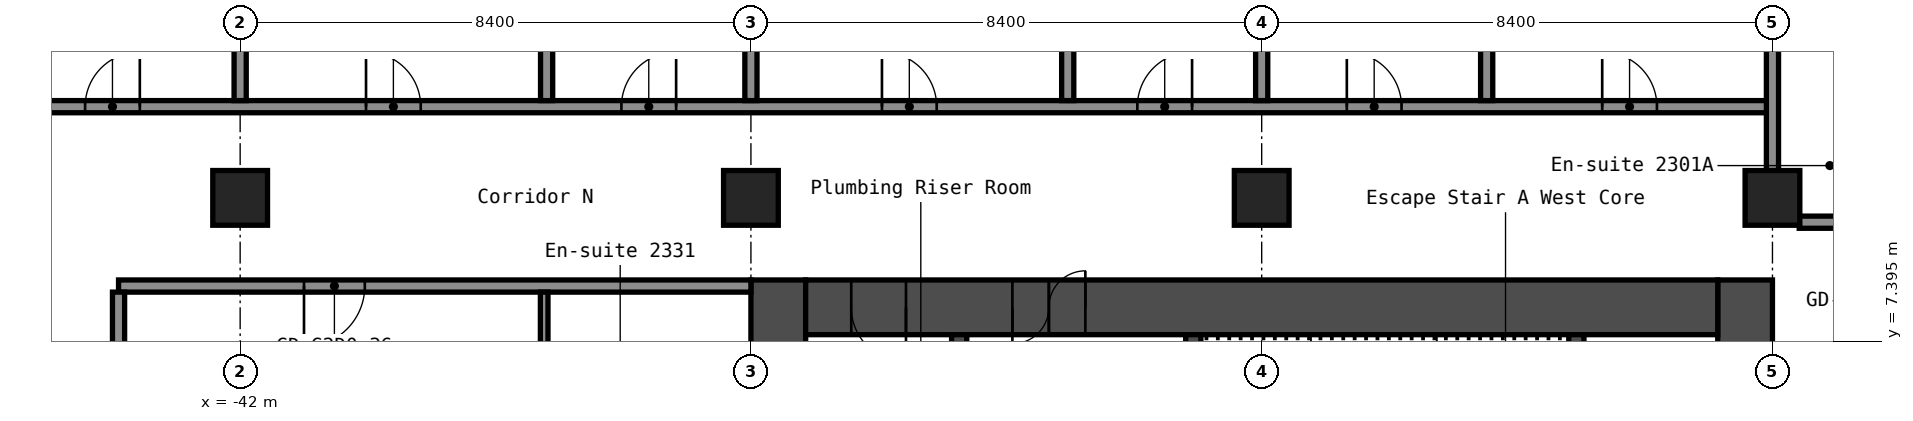
"""IFC4 building model, lengths in metres.
Left out: names, types, materials, properties, quantities, classifications, styles, units other than length and angle.
Written with IfcOpenShell. Run it as: python <this file> out.ifc"""

import sys

from ifc_helpers import new_model, si_unit, direction, frame, frame_2d, origin, origin_2d, place, context, subcontext, project, spatial, rectangle, hollow_rectangle, extrude, element, fill, save


model = new_model("IFC4")
c1 = context("Model", 3, precision=1e-05, world=origin(), true_north=direction((0.0, 1.0)))
c2 = subcontext(c1, "Body", "Model", "MODEL_VIEW")
j1 = project(units=[si_unit("LENGTHUNIT", "METRE"), si_unit("PLANEANGLEUNIT", "RADIAN")], contexts=[c1])
p1 = place(None, origin())
s1 = spatial("IfcSite", under=j1, at=p1, CompositionType="ELEMENT")
p2 = place(p1, origin())
s2 = spatial("IfcBuilding", under=s1, at=p2, CompositionType="ELEMENT")
p3 = place(p2, frame((0.0, 0.0, 85.0)))
s3 = spatial("IfcBuildingStorey", under=s2, at=p3, CompositionType="ELEMENT", Elevation=85.0)
for number, where, z_axis, x_axis in (
    (1, (-42.0, 9.75, 0.0), (0.0, 0.0, 1.0), (1.0, 0.0, 0.0)),
    (2, (-33.6, 9.75, 0.0), (0.0, 0.0, 1.0), (1.0, 0.0, 0.0)),
    (3, (-25.2, 9.75, 0.0), (0.0, 0.0, 1.0), (1.0, 0.0, 0.0)),
    (4, (-16.8, 9.75, 0.0), (0.0, 0.0, 1.0), (1.0, 0.0, 0.0)),
):
    element("IfcColumn", number, at=place(p3, frame(where, z_axis=z_axis, x_axis=x_axis)), inside=s3, PredefinedType="COLUMN", context=c2, shape_type="SweptSolid", body=[
        extrude(hollow_rectangle(XDim=0.9, YDim=0.9, WallThickness=0.036, at=origin_2d()), origin(), (0.0, 0.0, 1.0), 2.8),
    ])
p4 = place(p3, frame((-17.25, -8.4, 0.0), z_axis=(0.0, 0.0, 1.0), x_axis=(0.0, 1.0, 0.0)))
e5 = element("IfcWall", 5, at=p4, inside=s3, PredefinedType="SHEAR", context=c2, shape_type="SweptSolid", body=[
    extrude(rectangle(XDim=16.8, YDim=0.9, at=frame_2d((8.4, 0.0))), origin(), (0.0, 0.0, 1.0), 2.8),
])
p5 = place(p4, frame((7.6, 0.0, 0.0)))
e6 = element("IfcOpeningElement", 6, at=p5, cuts=e5, PredefinedType="OPENING", context=c2, shape_type="SweptSolid", body=[
    extrude(rectangle(XDim=1.2, YDim=2.1, at=frame_2d((0.6, 1.05))), frame((0.0, 0.46, 0.0), z_axis=(0.0, -1.0, 0.0), x_axis=(1.0, 0.0, 0.0)), (0.0, 0.0, 1.0), 0.92),
])
p6 = place(p3, frame((-33.15, -8.4, 0.0), z_axis=(0.0, 0.0, 1.0), x_axis=(0.0, 1.0, 0.0)))
e7 = element("IfcWall", 7, at=p6, inside=s3, PredefinedType="SHEAR", context=c2, shape_type="SweptSolid", body=[
    extrude(rectangle(XDim=16.8, YDim=0.9, at=frame_2d((8.4, 0.0))), origin(), (0.0, 0.0, 1.0), 2.8),
])
p7 = place(p3, frame((-32.7, 7.95, 0.0), z_axis=(0.0, 0.0, 1.0), x_axis=(1.0, 0.0, 0.0)))
e8 = element("IfcWall", 8, at=p7, inside=s3, PredefinedType="SHEAR", context=c2, shape_type="SweptSolid", body=[
    extrude(rectangle(XDim=15.0, YDim=0.9, at=frame_2d((7.5, 0.0))), origin(), (0.0, 0.0, 1.0), 2.8),
])
p8 = place(p7, frame((3.4, 0.0, 0.0)))
e9 = element("IfcOpeningElement", 9, at=p8, cuts=e8, PredefinedType="OPENING", context=c2, shape_type="SweptSolid", body=[
    extrude(rectangle(XDim=1.2, YDim=2.1, at=frame_2d((0.6, 1.05))), frame((0.0, 0.46, 0.0), z_axis=(0.0, -1.0, 0.0), x_axis=(1.0, 0.0, 0.0)), (0.0, 0.0, 1.0), 0.92),
])
p9 = place(p7, frame((0.75, 0.0, 0.0)))
e10 = element("IfcOpeningElement", 10, at=p9, cuts=e8, PredefinedType="OPENING", context=c2, shape_type="SweptSolid", body=[
    extrude(rectangle(XDim=0.9, YDim=2.1, at=frame_2d((0.45, 1.05))), frame((0.0, 0.46, 0.0), z_axis=(0.0, -1.0, 0.0), x_axis=(1.0, 0.0, 0.0)), (0.0, 0.0, 1.0), 0.92),
])
p10 = place(p3, frame((-20.025, 1.2, 0.0), z_axis=(0.0, 0.0, 1.0), x_axis=(0.0, 1.0, 0.0)))
e11 = element("IfcWall", 11, at=p10, inside=s3, PredefinedType="SHEAR", context=c2, shape_type="SweptSolid", body=[
    extrude(rectangle(XDim=6.3, YDim=0.25, at=frame_2d((3.15, 0.0))), origin(), (0.0, 0.0, 1.0), 2.8),
])
p11 = place(p3, frame((-26.325, 3.75, 0.0), z_axis=(0.0, 0.0, 1.0), x_axis=(0.0, 1.0, 0.0)))
e12 = element("IfcWall", 12, at=p11, inside=s3, PredefinedType="SHEAR", context=c2, shape_type="SweptSolid", body=[
    extrude(rectangle(XDim=3.75, YDim=0.25, at=frame_2d((1.875, 0.0))), origin(), (0.0, 0.0, 1.0), 2.8),
])
p12 = place(p11, frame((1.25, 0.0, 0.0)))
e13 = element("IfcOpeningElement", 13, at=p12, cuts=e12, PredefinedType="OPENING", context=c2, shape_type="SweptSolid", body=[
    extrude(rectangle(XDim=1.2, YDim=2.1, at=frame_2d((0.6, 1.05))), frame((0.0, 0.135, 0.0), z_axis=(0.0, -1.0, 0.0), x_axis=(1.0, 0.0, 0.0)), (0.0, 0.0, 1.0), 0.27),
])
p13 = place(p3, frame((-30.175, 1.45, 0.0), z_axis=(0.0, 0.0, 1.0), x_axis=(0.0, 1.0, 0.0)))
e14 = element("IfcWall", 14, at=p13, inside=s3, PredefinedType="SHEAR", context=c2, shape_type="SweptSolid", body=[
    extrude(rectangle(XDim=6.05, YDim=0.25, at=frame_2d((3.025, 0.0))), origin(), (0.0, 0.0, 1.0), 2.8),
])
p14 = place(p13, frame((2.625, 0.0, 0.0)))
e15 = element("IfcOpeningElement", 15, at=p14, cuts=e14, PredefinedType="OPENING", context=c2, shape_type="SweptSolid", body=[
    extrude(rectangle(XDim=1.1, YDim=2.1, at=frame_2d((0.55, 1.05))), frame((0.0, 0.135, 0.0), z_axis=(0.0, -1.0, 0.0), x_axis=(1.0, 0.0, 0.0)), (0.0, 0.0, 1.0), 0.27),
])
p15 = place(p3, frame((-44.0, 8.3, 0.0), z_axis=(0.0, 0.0, 1.0), x_axis=(1.0, 0.0, 0.0)))
e16 = element("IfcWall", 16, at=p15, inside=s3, PredefinedType="PARTITIONING", context=c2, shape_type="SweptSolid", body=[
    extrude(rectangle(XDim=10.4, YDim=0.2, at=frame_2d((5.2, 0.0))), origin(), (0.0, 0.0, 1.0), 2.8),
])
p16 = place(p15, frame((3.05, 0.0, 0.0)))
e17 = element("IfcOpeningElement", 17, at=p16, cuts=e16, PredefinedType="OPENING", context=c2, shape_type="SweptSolid", body=[
    extrude(rectangle(XDim=1.0, YDim=2.1, at=frame_2d((0.5, 1.05))), frame((0.0, 0.11, 0.0), z_axis=(0.0, -1.0, 0.0), x_axis=(1.0, 0.0, 0.0)), (0.0, 0.0, 1.0), 0.22),
])
p17 = place(p3, frame((-16.36, 9.35, 0.0), z_axis=(0.0, 0.0, 1.0), x_axis=(1.0, 0.0, 0.0)))
e18 = element("IfcWall", 18, at=p17, inside=s3, PredefinedType="PARTITIONING", context=c2, shape_type="SweptSolid", body=[
    extrude(rectangle(XDim=32.72, YDim=0.2, at=frame_2d((16.36, 0.0))), origin(), (0.0, 0.0, 1.0), 2.8),
])
p18 = place(p17, frame((2.41, 0.0, 0.0)))
e19 = element("IfcOpeningElement", 19, at=p18, cuts=e18, PredefinedType="OPENING", context=c2, shape_type="SweptSolid", body=[
    extrude(rectangle(XDim=1.0, YDim=2.1, at=frame_2d((0.5, 1.05))), frame((0.0, 0.11, 0.0), z_axis=(0.0, -1.0, 0.0), x_axis=(1.0, 0.0, 0.0)), (0.0, 0.0, 1.0), 0.22),
])
p19 = place(p17, frame((4.11, 0.0, 0.0)))
e20 = element("IfcOpeningElement", 20, at=p19, cuts=e18, PredefinedType="OPENING", context=c2, shape_type="SweptSolid", body=[
    extrude(rectangle(XDim=1.0, YDim=2.1, at=frame_2d((0.5, 1.05))), frame((0.0, 0.11, 0.0), z_axis=(0.0, -1.0, 0.0), x_axis=(1.0, 0.0, 0.0)), (0.0, 0.0, 1.0), 0.22),
])
p20 = place(p17, frame((9.96, 0.0, 0.0)))
e21 = element("IfcOpeningElement", 21, at=p20, cuts=e18, PredefinedType="OPENING", context=c2, shape_type="SweptSolid", body=[
    extrude(rectangle(XDim=1.0, YDim=2.1, at=frame_2d((0.5, 1.05))), frame((0.0, 0.11, 0.0), z_axis=(0.0, -1.0, 0.0), x_axis=(1.0, 0.0, 0.0)), (0.0, 0.0, 1.0), 0.22),
])
p21 = place(p17, frame((19.21, 0.0, 0.0)))
e22 = element("IfcOpeningElement", 22, at=p21, cuts=e18, PredefinedType="OPENING", context=c2, shape_type="SweptSolid", body=[
    extrude(rectangle(XDim=1.0, YDim=2.1, at=frame_2d((0.5, 1.05))), frame((0.0, 0.11, 0.0), z_axis=(0.0, -1.0, 0.0), x_axis=(1.0, 0.0, 0.0)), (0.0, 0.0, 1.0), 0.22),
])
p22 = place(p17, frame((20.91, 0.0, 0.0)))
e23 = element("IfcOpeningElement", 23, at=p22, cuts=e18, PredefinedType="OPENING", context=c2, shape_type="SweptSolid", body=[
    extrude(rectangle(XDim=1.0, YDim=2.1, at=frame_2d((0.5, 1.05))), frame((0.0, 0.11, 0.0), z_axis=(0.0, -1.0, 0.0), x_axis=(1.0, 0.0, 0.0)), (0.0, 0.0, 1.0), 0.22),
])
p23 = place(p17, frame((30.16, 0.0, 0.0)))
e24 = element("IfcOpeningElement", 24, at=p23, cuts=e18, PredefinedType="OPENING", context=c2, shape_type="SweptSolid", body=[
    extrude(rectangle(XDim=1.0, YDim=2.1, at=frame_2d((0.5, 1.05))), frame((0.0, 0.11, 0.0), z_axis=(0.0, -1.0, 0.0), x_axis=(1.0, 0.0, 0.0)), (0.0, 0.0, 1.0), 0.22),
])
p24 = place(p3, frame((-46.5, 11.25, 0.0), z_axis=(0.0, 0.0, 1.0), x_axis=(1.0, 0.0, 0.0)))
e25 = element("IfcWall", 25, at=p24, inside=s3, PredefinedType="PARTITIONING", context=c2, shape_type="SweptSolid", body=[
    extrude(rectangle(XDim=29.7, YDim=0.2, at=frame_2d((14.85, 0.0))), origin(), (0.0, 0.0, 1.0), 2.8),
])
p25 = place(p24, frame((1.95, 0.0, 0.0)))
e26 = element("IfcOpeningElement", 26, at=p25, cuts=e25, PredefinedType="OPENING", context=c2, shape_type="SweptSolid", body=[
    extrude(rectangle(XDim=0.9, YDim=2.1, at=frame_2d((0.45, 1.05))), frame((0.0, 0.11, 0.0), z_axis=(0.0, -1.0, 0.0), x_axis=(1.0, 0.0, 0.0)), (0.0, 0.0, 1.0), 0.22),
])
p26 = place(p24, frame((6.57, 0.0, 0.0)))
e27 = element("IfcOpeningElement", 27, at=p26, cuts=e25, PredefinedType="OPENING", context=c2, shape_type="SweptSolid", body=[
    extrude(rectangle(XDim=0.9, YDim=2.1, at=frame_2d((0.45, 1.05))), frame((0.0, 0.11, 0.0), z_axis=(0.0, -1.0, 0.0), x_axis=(1.0, 0.0, 0.0)), (0.0, 0.0, 1.0), 0.22),
])
p27 = place(p24, frame((10.77, 0.0, 0.0)))
e28 = element("IfcOpeningElement", 28, at=p27, cuts=e25, PredefinedType="OPENING", context=c2, shape_type="SweptSolid", body=[
    extrude(rectangle(XDim=0.9, YDim=2.1, at=frame_2d((0.45, 1.05))), frame((0.0, 0.11, 0.0), z_axis=(0.0, -1.0, 0.0), x_axis=(1.0, 0.0, 0.0)), (0.0, 0.0, 1.0), 0.22),
])
p28 = place(p24, frame((15.055, 0.0, 0.0)))
e29 = element("IfcOpeningElement", 29, at=p28, cuts=e25, PredefinedType="OPENING", context=c2, shape_type="SweptSolid", body=[
    extrude(rectangle(XDim=0.9, YDim=2.1, at=frame_2d((0.45, 1.05))), frame((0.0, 0.11, 0.0), z_axis=(0.0, -1.0, 0.0), x_axis=(1.0, 0.0, 0.0)), (0.0, 0.0, 1.0), 0.22),
])
p29 = place(p24, frame((19.255, 0.0, 0.0)))
e30 = element("IfcOpeningElement", 30, at=p29, cuts=e25, PredefinedType="OPENING", context=c2, shape_type="SweptSolid", body=[
    extrude(rectangle(XDim=0.9, YDim=2.1, at=frame_2d((0.45, 1.05))), frame((0.0, 0.11, 0.0), z_axis=(0.0, -1.0, 0.0), x_axis=(1.0, 0.0, 0.0)), (0.0, 0.0, 1.0), 0.22),
])
p30 = place(p24, frame((22.7, 0.0, 0.0)))
e31 = element("IfcOpeningElement", 31, at=p30, cuts=e25, PredefinedType="OPENING", context=c2, shape_type="SweptSolid", body=[
    extrude(rectangle(XDim=0.9, YDim=2.1, at=frame_2d((0.45, 1.05))), frame((0.0, 0.11, 0.0), z_axis=(0.0, -1.0, 0.0), x_axis=(1.0, 0.0, 0.0)), (0.0, 0.0, 1.0), 0.22),
])
p31 = place(p24, frame((26.9, 0.0, 0.0)))
e32 = element("IfcOpeningElement", 32, at=p31, cuts=e25, PredefinedType="OPENING", context=c2, shape_type="SweptSolid", body=[
    extrude(rectangle(XDim=0.9, YDim=2.1, at=frame_2d((0.45, 1.05))), frame((0.0, 0.11, 0.0), z_axis=(0.0, -1.0, 0.0), x_axis=(1.0, 0.0, 0.0)), (0.0, 0.0, 1.0), 0.22),
])
p32 = place(p3, frame((-44.0, -8.2, 0.0), z_axis=(0.0, 0.0, 1.0), x_axis=(0.0, 1.0, 0.0)))
e33 = element("IfcWall", 33, at=p32, inside=s3, PredefinedType="PARTITIONING", context=c2, shape_type="SweptSolid", body=[
    extrude(rectangle(XDim=16.4, YDim=0.2, at=frame_2d((8.2, 0.0))), origin(), (0.0, 0.0, 1.0), 2.8),
])
p33 = place(p3, frame((-42.0, 11.35, 0.0), z_axis=(0.0, 0.0, 1.0), x_axis=(0.0, 1.0, 0.0)))
e34 = element("IfcWall", 34, at=p33, inside=s3, PredefinedType="PARTITIONING", context=c2, shape_type="SweptSolid", body=[
    extrude(rectangle(XDim=12.2, YDim=0.2, at=frame_2d((6.1, 0.0))), origin(), (0.0, 0.0, 1.0), 2.8),
])
p34 = place(p3, frame((-37.0, 4.9, 0.0), z_axis=(0.0, 0.0, 1.0), x_axis=(0.0, 1.0, 0.0)))
e35 = element("IfcWall", 35, at=p34, inside=s3, PredefinedType="PARTITIONING", context=c2, shape_type="SweptSolid", body=[
    extrude(rectangle(XDim=3.3, YDim=0.125, at=frame_2d((1.65, 0.0))), origin(), (0.0, 0.0, 1.0), 2.8),
])
for number, where, z_axis, x_axis in (
    (36, (-36.96, 11.35, 0.0), (0.0, 0.0, 1.0), (0.0, 1.0, 0.0)),
    (37, (-33.6, 11.35, 0.0), (0.0, 0.0, 1.0), (0.0, 1.0, 0.0)),
    (38, (-28.39, 11.35, 0.0), (0.0, 0.0, 1.0), (0.0, 1.0, 0.0)),
    (39, (-25.2, 11.35, 0.0), (0.0, 0.0, 1.0), (0.0, 1.0, 0.0)),
    (40, (-21.5, 11.35, 0.0), (0.0, 0.0, 1.0), (0.0, 1.0, 0.0)),
):
    element("IfcWall", number, at=place(p3, frame(where, z_axis=z_axis, x_axis=x_axis)), inside=s3, PredefinedType="PARTITIONING", context=c2, shape_type="SweptSolid", body=[
        extrude(rectangle(XDim=12.2, YDim=0.2, at=frame_2d((6.1, 0.0))), origin(), (0.0, 0.0, 1.0), 2.8),
    ])
p35 = place(p3, frame((-16.8, 10.19, 0.0), z_axis=(0.0, 0.0, 1.0), x_axis=(0.0, 1.0, 0.0)))
e41 = element("IfcWall", 41, at=p35, inside=s3, PredefinedType="PARTITIONING", context=c2, shape_type="SweptSolid", body=[
    extrude(rectangle(XDim=13.36, YDim=0.2, at=frame_2d((6.68, 0.0))), origin(), (0.0, 0.0, 1.0), 2.8),
])
p36 = place(p8, origin())
e42 = element("IfcDoor", 42, at=p36, inside=s3, OperationType="DOUBLE_DOOR_SINGLE_SWING", PredefinedType="DOOR", context=c2, shape_type="SweptSolid", body=[
    extrude(rectangle(XDim=1.2, YDim=2.1, at=frame_2d((0.6, 1.05))), frame((0.0, 0.025, 0.0), z_axis=(0.0, -1.0, 0.0), x_axis=(1.0, 0.0, 0.0)), (0.0, 0.0, 1.0), 0.05),
])
fill(e9, e42)
p37 = place(p9, origin())
e43 = element("IfcDoor", 43, at=p37, inside=s3, OperationType="SINGLE_SWING_RIGHT", PredefinedType="DOOR", context=c2, shape_type="SweptSolid", body=[
    extrude(rectangle(XDim=0.9, YDim=2.1, at=frame_2d((0.45, 1.05))), frame((0.0, 0.025, 0.0), z_axis=(0.0, -1.0, 0.0), x_axis=(1.0, 0.0, 0.0)), (0.0, 0.0, 1.0), 0.05),
])
fill(e10, e43)
p38 = place(p16, origin())
e44 = element("IfcDoor", 44, at=p38, inside=s3, OperationType="SINGLE_SWING_LEFT", PredefinedType="DOOR", context=c2, shape_type="SweptSolid", body=[
    extrude(rectangle(XDim=1.0, YDim=2.1, at=frame_2d((0.5, 1.05))), frame((0.0, 0.025, 0.0), z_axis=(0.0, -1.0, 0.0), x_axis=(1.0, 0.0, 0.0)), (0.0, 0.0, 1.0), 0.05),
])
fill(e17, e44)
p39 = place(p25, origin())
e45 = element("IfcDoor", 45, at=p39, inside=s3, OperationType="SINGLE_SWING_LEFT", PredefinedType="DOOR", context=c2, shape_type="SweptSolid", body=[
    extrude(rectangle(XDim=0.9, YDim=2.1, at=frame_2d((0.45, 1.05))), frame((0.0, 0.025, 0.0), z_axis=(0.0, -1.0, 0.0), x_axis=(1.0, 0.0, 0.0)), (0.0, 0.0, 1.0), 0.05),
])
fill(e26, e45)
p40 = place(p26, origin())
e46 = element("IfcDoor", 46, at=p40, inside=s3, OperationType="SINGLE_SWING_RIGHT", PredefinedType="DOOR", context=c2, shape_type="SweptSolid", body=[
    extrude(rectangle(XDim=0.9, YDim=2.1, at=frame_2d((0.45, 1.05))), frame((0.0, 0.025, 0.0), z_axis=(0.0, -1.0, 0.0), x_axis=(1.0, 0.0, 0.0)), (0.0, 0.0, 1.0), 0.05),
])
fill(e27, e46)
p41 = place(p27, origin())
e47 = element("IfcDoor", 47, at=p41, inside=s3, OperationType="SINGLE_SWING_LEFT", PredefinedType="DOOR", context=c2, shape_type="SweptSolid", body=[
    extrude(rectangle(XDim=0.9, YDim=2.1, at=frame_2d((0.45, 1.05))), frame((0.0, 0.025, 0.0), z_axis=(0.0, -1.0, 0.0), x_axis=(1.0, 0.0, 0.0)), (0.0, 0.0, 1.0), 0.05),
])
fill(e28, e47)
p42 = place(p28, origin())
e48 = element("IfcDoor", 48, at=p42, inside=s3, OperationType="SINGLE_SWING_RIGHT", PredefinedType="DOOR", context=c2, shape_type="SweptSolid", body=[
    extrude(rectangle(XDim=0.9, YDim=2.1, at=frame_2d((0.45, 1.05))), frame((0.0, 0.025, 0.0), z_axis=(0.0, -1.0, 0.0), x_axis=(1.0, 0.0, 0.0)), (0.0, 0.0, 1.0), 0.05),
])
fill(e29, e48)
p43 = place(p29, origin())
e49 = element("IfcDoor", 49, at=p43, inside=s3, OperationType="SINGLE_SWING_LEFT", PredefinedType="DOOR", context=c2, shape_type="SweptSolid", body=[
    extrude(rectangle(XDim=0.9, YDim=2.1, at=frame_2d((0.45, 1.05))), frame((0.0, 0.025, 0.0), z_axis=(0.0, -1.0, 0.0), x_axis=(1.0, 0.0, 0.0)), (0.0, 0.0, 1.0), 0.05),
])
fill(e30, e49)
p44 = place(p30, origin())
e50 = element("IfcDoor", 50, at=p44, inside=s3, OperationType="SINGLE_SWING_RIGHT", PredefinedType="DOOR", context=c2, shape_type="SweptSolid", body=[
    extrude(rectangle(XDim=0.9, YDim=2.1, at=frame_2d((0.45, 1.05))), frame((0.0, 0.025, 0.0), z_axis=(0.0, -1.0, 0.0), x_axis=(1.0, 0.0, 0.0)), (0.0, 0.0, 1.0), 0.05),
])
fill(e31, e50)
p45 = place(p31, origin())
e51 = element("IfcDoor", 51, at=p45, inside=s3, OperationType="SINGLE_SWING_RIGHT", PredefinedType="DOOR", context=c2, shape_type="SweptSolid", body=[
    extrude(rectangle(XDim=0.9, YDim=2.1, at=frame_2d((0.45, 1.05))), frame((0.0, 0.025, 0.0), z_axis=(0.0, -1.0, 0.0), x_axis=(1.0, 0.0, 0.0)), (0.0, 0.0, 1.0), 0.05),
])
fill(e32, e51)
save(model, sys.argv[1])
